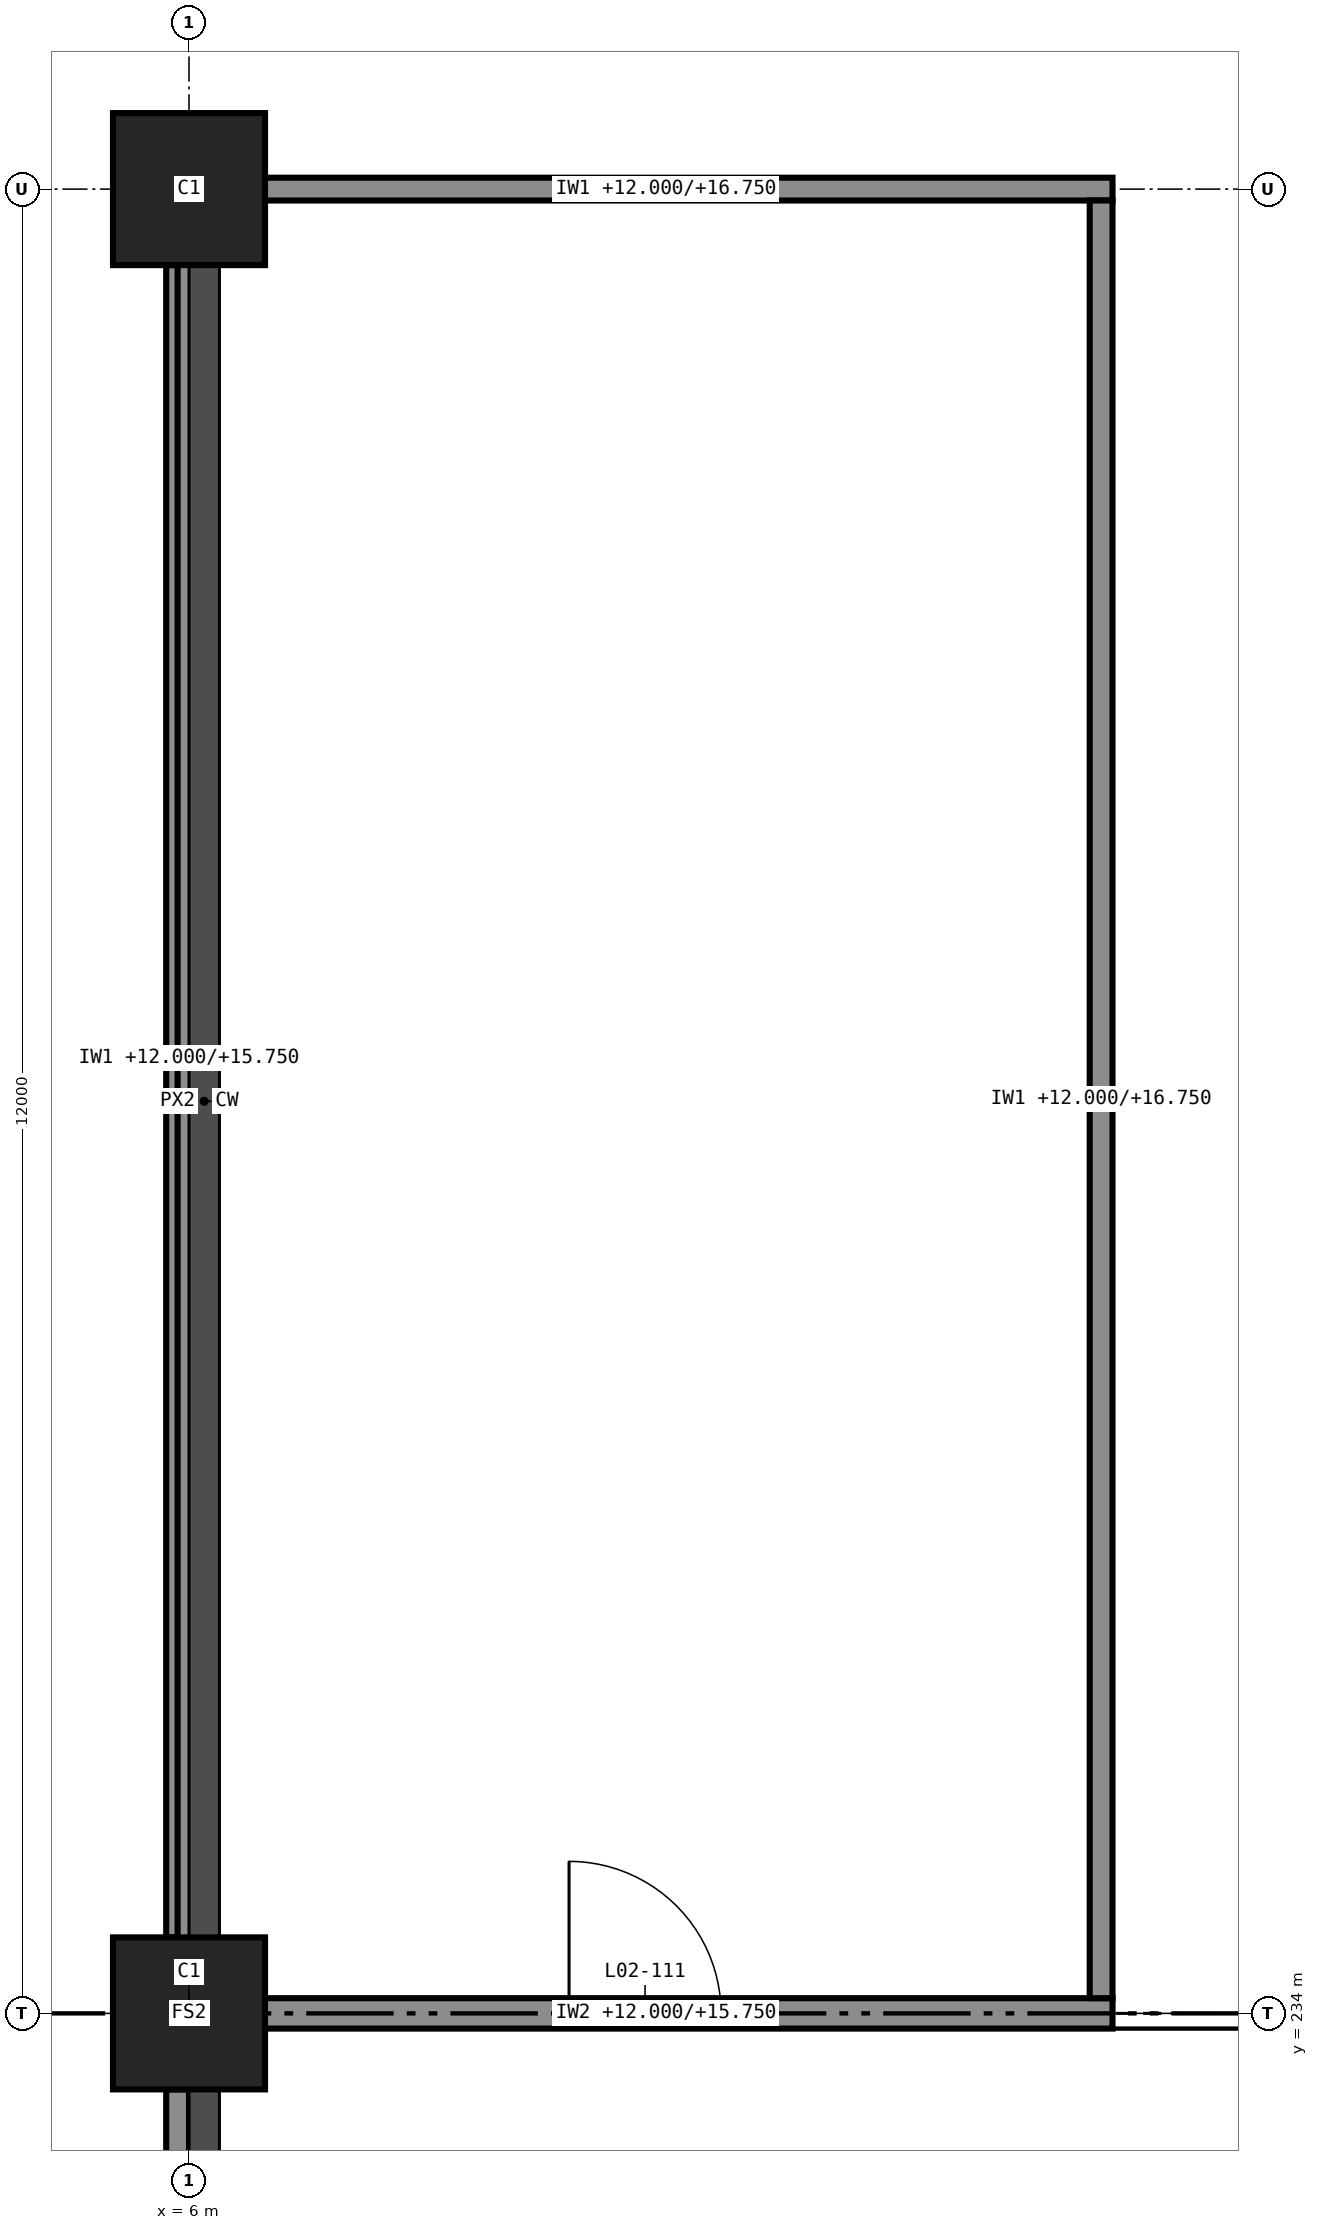
"""IFC4 building model, lengths in metres.
Left out: names, types, materials, properties, quantities, classifications, styles, units other than length and angle.
Written with IfcOpenShell. Run it as: python <this file> out.ifc"""

import sys

from ifc_helpers import new_model, si_unit, direction, frame, frame_2d, origin, origin_2d, place, context, subcontext, project, spatial, rectangle, extrude, element, fill, save


model = new_model("IFC4")
c1 = context("Model", 3, precision=1e-05, world=origin(), true_north=direction((0.0, 1.0)))
c2 = subcontext(c1, "Body", "Model", "MODEL_VIEW")
j1 = project(units=[si_unit("LENGTHUNIT", "METRE"), si_unit("PLANEANGLEUNIT", "RADIAN")], contexts=[c1])
p1 = place(None, origin())
s1 = spatial("IfcSite", under=j1, at=p1, CompositionType="ELEMENT")
p2 = place(p1, origin())
s2 = spatial("IfcBuilding", under=s1, at=p2, CompositionType="ELEMENT")
p3 = place(p2, frame((0.0, 0.0, 12.0)))
s3 = spatial("IfcBuildingStorey", under=s2, at=p3, CompositionType="ELEMENT", Elevation=12.0)
for number, where, z_axis, x_axis in (
    (1, (6.0, 234.0, 0.0), (0.0, 0.0, 1.0), (1.0, 0.0, 0.0)),
    (2, (6.0, 246.0, 0.0), (0.0, 0.0, 1.0), (1.0, 0.0, 0.0)),
):
    element("IfcColumn", number, at=place(p3, frame(where, z_axis=z_axis, x_axis=x_axis)), inside=s3, PredefinedType="COLUMN", context=c2, shape_type="SweptSolid", body=[
        extrude(rectangle(XDim=1.0, YDim=1.0, at=origin_2d()), origin(), (0.0, 0.0, 1.0), 5.0),
    ])
p4 = place(p3, frame((5.925, 245.5, 4.75), z_axis=(0.0, 0.0, 1.0), x_axis=(0.0, -1.0, 0.0)))
e3 = element("IfcWall", 3, at=p4, inside=s3, PredefinedType="STANDARD", context=c2, shape_type="SweptSolid", body=[
    extrude(rectangle(XDim=11.0, YDim=0.15, at=frame_2d((5.5, 0.0))), origin(), (0.0, 0.0, 1.0), 0.25),
])
p5 = place(p3, frame((5.925, 233.5, 4.75), z_axis=(0.0, 0.0, 1.0), x_axis=(0.0, -1.0, 0.0)))
e4 = element("IfcWall", 4, at=p5, inside=s3, PredefinedType="STANDARD", context=c2, shape_type="SweptSolid", body=[
    extrude(rectangle(XDim=11.5, YDim=0.15, at=frame_2d((5.75, 0.0))), origin(), (0.0, 0.0, 1.0), 0.25),
])
p6 = place(p3, frame((6.2, 234.0, 0.0), z_axis=(0.0, 0.0, 1.0), x_axis=(1.0, 0.0, 0.0)))
e5 = element("IfcWall", 5, at=p6, inside=s3, PredefinedType="PARTITIONING", context=c2, shape_type="SweptSolid", body=[
    extrude(rectangle(XDim=5.875, YDim=0.2, at=frame_2d((2.938, 0.0))), origin(), (0.0, 0.0, 1.0), 3.75),
])
p7 = place(p6, frame((2.3, 0.0, 0.0)))
e6 = element("IfcOpeningElement", 6, at=p7, cuts=e5, PredefinedType="OPENING", context=c2, shape_type="SweptSolid", body=[
    extrude(rectangle(XDim=1.0, YDim=2.1, at=frame_2d((0.5, 1.05))), frame((0.0, 0.11, 0.0), z_axis=(0.0, -1.0, 0.0), x_axis=(1.0, 0.0, 0.0)), (0.0, 0.0, 1.0), 0.22),
])
p8 = place(p3, frame((6.2, 246.0, 0.0), z_axis=(0.0, 0.0, 1.0), x_axis=(1.0, 0.0, 0.0)))
e7 = element("IfcWall", 7, at=p8, inside=s3, PredefinedType="PARTITIONING", context=c2, shape_type="SweptSolid", body=[
    extrude(rectangle(XDim=5.875, YDim=0.15, at=frame_2d((2.938, 0.0))), origin(), (0.0, 0.0, 1.0), 4.75),
])
p9 = place(p3, frame((6.0, 234.1, 0.0), z_axis=(0.0, 0.0, 1.0), x_axis=(0.0, 1.0, 0.0)))
e8 = element("IfcWall", 8, at=p9, inside=s3, PredefinedType="PARTITIONING", context=c2, shape_type="SweptSolid", body=[
    extrude(rectangle(XDim=11.825, YDim=0.15, at=frame_2d((5.913, 0.0))), origin(), (0.0, 0.0, 1.0), 3.75),
])
p10 = place(p3, frame((12.0, 234.1, 0.0), z_axis=(0.0, 0.0, 1.0), x_axis=(0.0, 1.0, 0.0)))
e9 = element("IfcWall", 9, at=p10, inside=s3, PredefinedType="PARTITIONING", context=c2, shape_type="SweptSolid", body=[
    extrude(rectangle(XDim=11.825, YDim=0.15, at=frame_2d((5.913, 0.0))), origin(), (0.0, 0.0, 1.0), 4.75),
])
p11 = place(p7, origin())
e10 = element("IfcDoor", 10, at=p11, inside=s3, OperationType="SINGLE_SWING_RIGHT", PredefinedType="DOOR", context=c2, shape_type="SweptSolid", body=[
    extrude(rectangle(XDim=1.0, YDim=2.1, at=frame_2d((0.5, 1.05))), frame((0.0, 0.025, 0.0), z_axis=(0.0, -1.0, 0.0), x_axis=(1.0, 0.0, 0.0)), (0.0, 0.0, 1.0), 0.05),
])
fill(e6, e10)
save(model, sys.argv[1])
